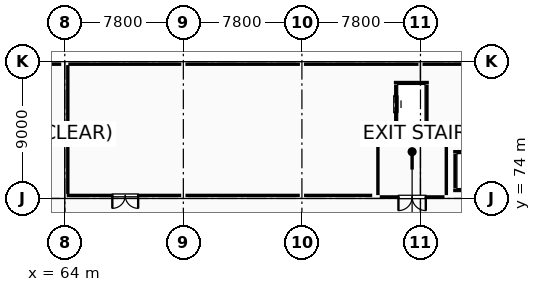
"""IFC4 building model, lengths in metres.
Left out: names, types, materials, properties, quantities, classifications, styles, units other than length and angle.
Written with IfcOpenShell. Run it as: python <this file> out.ifc"""

import sys

from ifc_helpers import new_model, si_unit, direction, frame, frame_2d, origin, origin_2d, place, context, subcontext, project, spatial, rectangle, hollow_rectangle, i_section, extrude, element, fill, save


model = new_model("IFC4")
c1 = context("Model", 3, precision=1e-05, world=origin(), true_north=direction((0.0, 1.0)))
c2 = subcontext(c1, "Body", "Model", "MODEL_VIEW")
j1 = project(units=[si_unit("LENGTHUNIT", "METRE"), si_unit("PLANEANGLEUNIT", "RADIAN")], contexts=[c1])
p1 = place(None, origin())
s1 = spatial("IfcSite", under=j1, at=p1, CompositionType="ELEMENT")
p2 = place(p1, origin())
s2 = spatial("IfcBuilding", under=s1, at=p2, CompositionType="ELEMENT")
p3 = place(p2, frame((0.0, 0.0, 10.2)))
s3 = spatial("IfcBuildingStorey", under=s2, at=p3, CompositionType="ELEMENT", Elevation=10.2)
p4 = place(p3, frame((64.0, 74.0, 0.0), z_axis=(0.0, 0.0, 1.0), x_axis=(1.0, 0.0, 0.0)))
e1 = element("IfcColumn", 1, at=p4, inside=s3, PredefinedType="COLUMN", context=c2, shape_type="SweptSolid", body=[
    extrude(i_section(OverallWidth=0.25, OverallDepth=0.45, WebThickness=0.011, FlangeThickness=0.014, FilletRadius=0.015, at=origin_2d()), origin(), (0.0, 0.0, 1.0), 4.8),
])
p5 = place(p3, frame((64.0, 83.0, 0.0), z_axis=(0.0, 0.0, 1.0), x_axis=(1.0, 0.0, 0.0)))
e2 = element("IfcColumn", 2, at=p5, inside=s3, PredefinedType="COLUMN", context=c2, shape_type="SweptSolid", body=[
    extrude(hollow_rectangle(XDim=0.45, YDim=0.45, WallThickness=0.02, at=origin_2d()), origin(), (0.0, 0.0, 1.0), 4.8),
])
for number, where, z_axis, x_axis in (
    (3, (71.8, 74.0, 0.0), (0.0, 0.0, 1.0), (1.0, 0.0, 0.0)),
    (4, (71.8, 83.0, 0.0), (0.0, 0.0, 1.0), (1.0, 0.0, 0.0)),
    (5, (79.6, 74.0, 0.0), (0.0, 0.0, 1.0), (1.0, 0.0, 0.0)),
    (6, (79.6, 83.0, 0.0), (0.0, 0.0, 1.0), (1.0, 0.0, 0.0)),
    (7, (87.4, 83.0, 0.0), (0.0, 0.0, 1.0), (1.0, 0.0, 0.0)),
):
    element("IfcColumn", number, at=place(p3, frame(where, z_axis=z_axis, x_axis=x_axis)), inside=s3, PredefinedType="COLUMN", context=c2, shape_type="SweptSolid", body=[
        extrude(i_section(OverallWidth=0.25, OverallDepth=0.45, WebThickness=0.011, FlangeThickness=0.014, FilletRadius=0.015, at=origin_2d()), origin(), (0.0, 0.0, 1.0), 4.8),
    ])
p6 = place(p3, frame((62.804, 82.83, 0.0), z_axis=(0.0, 0.0, 1.0), x_axis=(1.0, 0.0, 0.0)))
e8 = element("IfcWall", 8, at=p6, inside=s3, PredefinedType="STANDARD", context=c2, shape_type="SweptSolid", body=[
    extrude(rectangle(XDim=0.963, YDim=0.3, at=frame_2d((0.481, 0.0))), origin(), (0.0, 0.0, 1.0), 4.54),
])
p7 = place(p3, frame((64.233, 82.83, 0.0), z_axis=(0.0, 0.0, 1.0), x_axis=(1.0, 0.0, 0.0)))
e9 = element("IfcWall", 9, at=p7, inside=s3, PredefinedType="STANDARD", context=c2, shape_type="SweptSolid", body=[
    extrude(rectangle(XDim=7.434, YDim=0.3, at=frame_2d((3.717, 0.0))), origin(), (0.0, 0.0, 1.0), 4.075),
])
p8 = place(p3, frame((71.933, 82.83, 0.0), z_axis=(0.0, 0.0, 1.0), x_axis=(1.0, 0.0, 0.0)))
e10 = element("IfcWall", 10, at=p8, inside=s3, PredefinedType="STANDARD", context=c2, shape_type="SweptSolid", body=[
    extrude(rectangle(XDim=7.534, YDim=0.3, at=frame_2d((3.767, 0.0))), origin(), (0.0, 0.0, 1.0), 4.125),
])
p9 = place(p3, frame((79.733, 82.83, 0.0), z_axis=(0.0, 0.0, 1.0), x_axis=(1.0, 0.0, 0.0)))
e11 = element("IfcWall", 11, at=p9, inside=s3, PredefinedType="STANDARD", context=c2, shape_type="SweptSolid", body=[
    extrude(rectangle(XDim=7.534, YDim=0.3, at=frame_2d((3.767, 0.0))), origin(), (0.0, 0.0, 1.0), 4.175),
])
p10 = place(p3, frame((87.533, 82.83, 0.0), z_axis=(0.0, 0.0, 1.0), x_axis=(1.0, 0.0, 0.0)))
e12 = element("IfcWall", 12, at=p10, inside=s3, PredefinedType="STANDARD", context=c2, shape_type="SweptSolid", body=[
    extrude(rectangle(XDim=5.863, YDim=0.3, at=frame_2d((2.932, 0.0))), origin(), (0.0, 0.0, 1.0), 4.54),
])
p11 = place(p3, frame((89.55, 74.525, 0.0), z_axis=(0.0, 0.0, 1.0), x_axis=(1.0, 0.0, 0.0)))
e13 = element("IfcWall", 13, at=p11, inside=s3, PredefinedType="STANDARD", context=c2, shape_type="SweptSolid", body=[
    extrude(rectangle(XDim=2.5, YDim=0.25, at=frame_2d((1.25, 0.0))), origin(), (0.0, 0.0, 1.0), 4.53),
])
p12 = place(p11, frame((0.65, 0.0, 0.0)))
e14 = element("IfcOpeningElement", 14, at=p12, cuts=e13, PredefinedType="OPENING", context=c2, shape_type="SweptSolid", body=[
    extrude(rectangle(XDim=1.2, YDim=2.05, at=frame_2d((0.6, 1.025))), frame((0.0, 0.135, 0.0), z_axis=(0.0, -1.0, 0.0), x_axis=(1.0, 0.0, 0.0)), (0.0, 0.0, 1.0), 0.27),
])
p13 = place(p3, frame((92.05, 77.075, 0.0), z_axis=(0.0, 0.0, 1.0), x_axis=(-1.0, 0.0, 0.0)))
e15 = element("IfcWall", 15, at=p13, inside=s3, PredefinedType="STANDARD", context=c2, shape_type="SweptSolid", body=[
    extrude(rectangle(XDim=2.5, YDim=0.25, at=frame_2d((1.25, 0.0))), origin(), (0.0, 0.0, 1.0), 4.53),
])
p14 = place(p3, frame((89.675, 76.94, 0.0), z_axis=(0.0, 0.0, 1.0), x_axis=(0.0, -1.0, 0.0)))
e16 = element("IfcWall", 16, at=p14, inside=s3, PredefinedType="STANDARD", context=c2, shape_type="SweptSolid", body=[
    extrude(rectangle(XDim=2.28, YDim=0.25, at=frame_2d((1.14, 0.0))), origin(), (0.0, 0.0, 1.0), 4.53),
])
for number, where, z_axis, x_axis in (
    (17, (85.65, 78.775, 0.0), (0.0, 0.0, 1.0), (1.0, 0.0, 0.0)),
    (18, (87.95, 81.625, 0.0), (0.0, 0.0, 1.0), (-1.0, 0.0, 0.0)),
):
    element("IfcWall", number, at=place(p3, frame(where, z_axis=z_axis, x_axis=x_axis)), inside=s3, PredefinedType="STANDARD", context=c2, shape_type="SweptSolid", body=[
        extrude(rectangle(XDim=2.3, YDim=0.25, at=frame_2d((1.15, 0.0))), origin(), (0.0, 0.0, 1.0), 4.53),
    ])
p15 = place(p3, frame((87.825, 78.91, 0.0), z_axis=(0.0, 0.0, 1.0), x_axis=(0.0, 1.0, 0.0)))
e19 = element("IfcWall", 19, at=p15, inside=s3, PredefinedType="STANDARD", context=c2, shape_type="SweptSolid", body=[
    extrude(rectangle(XDim=2.58, YDim=0.25, at=frame_2d((1.29, 0.0))), origin(), (0.0, 0.0, 1.0), 4.53),
])
p16 = place(p3, frame((85.775, 81.49, 0.0), z_axis=(0.0, 0.0, 1.0), x_axis=(0.0, -1.0, 0.0)))
e20 = element("IfcWall", 20, at=p16, inside=s3, PredefinedType="STANDARD", context=c2, shape_type="SweptSolid", body=[
    extrude(rectangle(XDim=2.58, YDim=0.25, at=frame_2d((1.29, 0.0))), origin(), (0.0, 0.0, 1.0), 4.53),
])
p17 = place(p16, frame((0.74, 0.0, 0.0)))
e21 = element("IfcOpeningElement", 21, at=p17, cuts=e20, PredefinedType="OPENING", context=c2, shape_type="SweptSolid", body=[
    extrude(rectangle(XDim=1.1, YDim=2.15, at=frame_2d((0.55, 1.075))), frame((0.0, 0.135, 0.0), z_axis=(0.0, -1.0, 0.0), x_axis=(1.0, 0.0, 0.0)), (0.0, 0.0, 1.0), 0.27),
])
p18 = place(p3, frame((84.6, 74.22, 0.0), z_axis=(0.0, 0.0, 1.0), x_axis=(0.0, 1.0, 0.0)))
e22 = element("IfcWall", 22, at=p18, inside=s3, PredefinedType="PARTITIONING", context=c2, shape_type="SweptSolid", body=[
    extrude(rectangle(XDim=3.36, YDim=0.2, at=frame_2d((1.68, 0.0))), origin(), (0.0, 0.0, 1.0), 4.53),
])
p19 = place(p3, frame((84.72, 77.7, 0.0), z_axis=(0.0, 0.0, 1.0), x_axis=(1.0, 0.0, 0.0)))
e23 = element("IfcWall", 23, at=p19, inside=s3, PredefinedType="PARTITIONING", context=c2, shape_type="SweptSolid", body=[
    extrude(rectangle(XDim=4.26, YDim=0.2, at=frame_2d((2.13, 0.0))), origin(), (0.0, 0.0, 1.0), 4.53),
])
p20 = place(p3, frame((89.1, 77.58, 0.0), z_axis=(0.0, 0.0, 1.0), x_axis=(0.0, -1.0, 0.0)))
e24 = element("IfcWall", 24, at=p20, inside=s3, PredefinedType="PARTITIONING", context=c2, shape_type="SweptSolid", body=[
    extrude(rectangle(XDim=3.36, YDim=0.2, at=frame_2d((1.68, 0.0))), origin(), (0.0, 0.0, 1.0), 4.53),
])
p21 = place(p3, frame((88.98, 74.1, 0.0), z_axis=(0.0, 0.0, 1.0), x_axis=(-1.0, 0.0, 0.0)))
e25 = element("IfcWall", 25, at=p21, inside=s3, PredefinedType="PARTITIONING", context=c2, shape_type="SweptSolid", body=[
    extrude(rectangle(XDim=4.26, YDim=0.2, at=frame_2d((2.13, 0.0))), origin(), (0.0, 0.0, 1.0), 4.53),
])
p22 = place(p21, frame((1.23, 0.0, 0.0)))
e26 = element("IfcOpeningElement", 26, at=p22, cuts=e25, PredefinedType="OPENING", context=c2, shape_type="SweptSolid", body=[
    extrude(rectangle(XDim=1.8, YDim=2.15, at=frame_2d((0.9, 1.075))), frame((0.0, 0.11, 0.0), z_axis=(0.0, -1.0, 0.0), x_axis=(1.0, 0.0, 0.0)), (0.0, 0.0, 1.0), 0.22),
])
p23 = place(p3, frame((64.2, 74.295, 0.0), z_axis=(0.0, 0.0, 1.0), x_axis=(0.0, 1.0, 0.0)))
e27 = element("IfcWall", 27, at=p23, inside=s3, PredefinedType="PARTITIONING", context=c2, shape_type="SweptSolid", body=[
    extrude(rectangle(XDim=8.476, YDim=0.15, at=frame_2d((4.238, 0.0))), origin(), (0.0, 0.0, 1.0), 4.07),
])
p24 = place(p3, frame((84.225, 74.2, 0.0), z_axis=(0.0, 0.0, 1.0), x_axis=(-1.0, 0.0, 0.0)))
e28 = element("IfcWall", 28, at=p24, inside=s3, PredefinedType="PARTITIONING", context=c2, shape_type="SweptSolid", body=[
    extrude(rectangle(XDim=4.485, YDim=0.15, at=frame_2d((2.243, 0.0))), origin(), (0.0, 0.0, 1.0), 4.53),
])
p25 = place(p3, frame((79.46, 74.2, 0.0), z_axis=(0.0, 0.0, 1.0), x_axis=(-1.0, 0.0, 0.0)))
e29 = element("IfcWall", 29, at=p25, inside=s3, PredefinedType="PARTITIONING", context=c2, shape_type="SweptSolid", body=[
    extrude(rectangle(XDim=7.52, YDim=0.15, at=frame_2d((3.76, 0.0))), origin(), (0.0, 0.0, 1.0), 3.97),
])
p26 = place(p3, frame((71.66, 74.2, 0.0), z_axis=(0.0, 0.0, 1.0), x_axis=(-1.0, 0.0, 0.0)))
e30 = element("IfcWall", 30, at=p26, inside=s3, PredefinedType="PARTITIONING", context=c2, shape_type="SweptSolid", body=[
    extrude(rectangle(XDim=7.531, YDim=0.15, at=frame_2d((3.766, 0.0))), origin(), (0.0, 0.0, 1.0), 3.92),
])
p27 = place(p26, frame((2.832, 0.0, 0.0)))
e31 = element("IfcOpeningElement", 31, at=p27, cuts=e30, PredefinedType="OPENING", context=c2, shape_type="SweptSolid", body=[
    extrude(rectangle(XDim=1.7, YDim=2.25, at=frame_2d((0.85, 1.125))), frame((0.0, 0.085, 0.0), z_axis=(0.0, -1.0, 0.0), x_axis=(1.0, 0.0, 0.0)), (0.0, 0.0, 1.0), 0.17),
])
p28 = place(p17, origin())
e32 = element("IfcDoor", 32, at=p28, inside=s3, OperationType="DOUBLE_DOOR_SLIDING", PredefinedType="DOOR", context=c2, shape_type="SweptSolid", body=[
    extrude(rectangle(XDim=1.1, YDim=2.15, at=frame_2d((0.55, 1.075))), frame((0.0, 0.025, 0.0), z_axis=(0.0, -1.0, 0.0), x_axis=(1.0, 0.0, 0.0)), (0.0, 0.0, 1.0), 0.05),
])
fill(e21, e32)
p29 = place(p22, origin())
e33 = element("IfcDoor", 33, at=p29, inside=s3, OperationType="DOUBLE_DOOR_SINGLE_SWING", PredefinedType="DOOR", context=c2, shape_type="SweptSolid", body=[
    extrude(rectangle(XDim=1.8, YDim=2.15, at=frame_2d((0.9, 1.075))), frame((0.0, 0.025, 0.0), z_axis=(0.0, -1.0, 0.0), x_axis=(1.0, 0.0, 0.0)), (0.0, 0.0, 1.0), 0.05),
])
fill(e26, e33)
p30 = place(p27, origin())
e34 = element("IfcDoor", 34, at=p30, inside=s3, OperationType="DOUBLE_DOOR_SINGLE_SWING", PredefinedType="DOOR", context=c2, shape_type="SweptSolid", body=[
    extrude(rectangle(XDim=1.7, YDim=2.25, at=frame_2d((0.85, 1.125))), frame((0.0, 0.025, 0.0), z_axis=(0.0, -1.0, 0.0), x_axis=(1.0, 0.0, 0.0)), (0.0, 0.0, 1.0), 0.05),
])
fill(e31, e34)
save(model, sys.argv[1])
